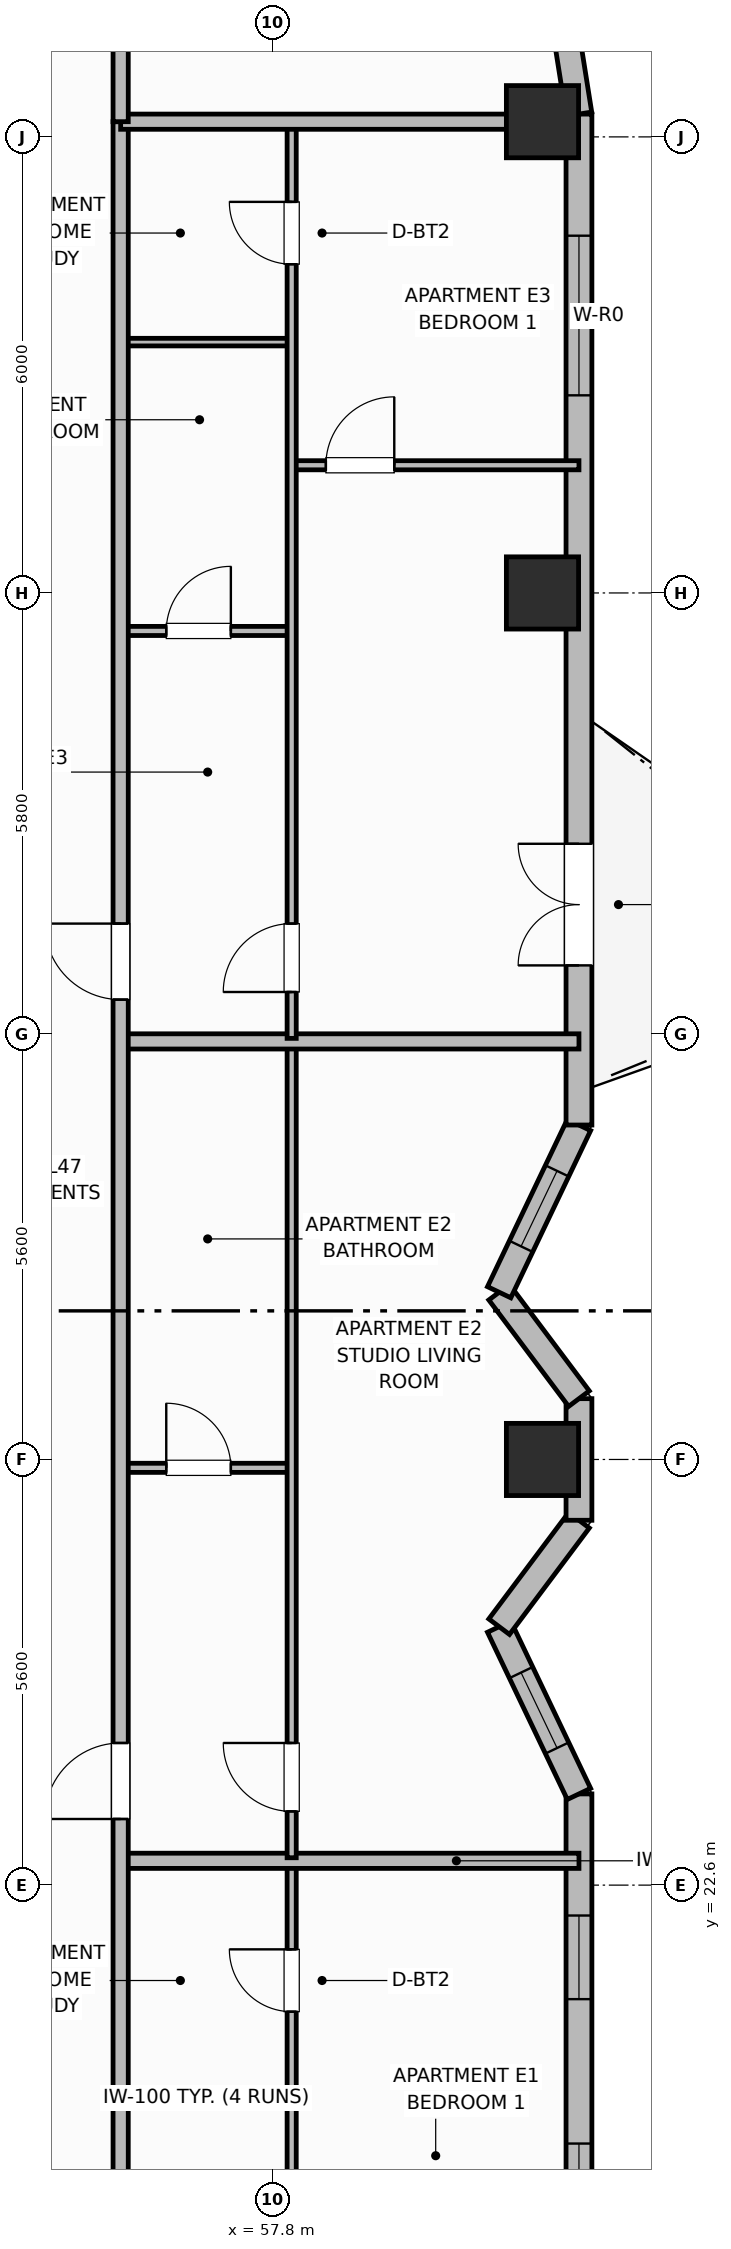
"""IFC4 building model, lengths in metres.
Left out: names, types, materials, properties, quantities, classifications, styles, units other than length and angle.
Written with IfcOpenShell. Run it as: python <this file> out.ifc"""

import sys

from ifc_helpers import new_model, si_unit, direction, frame, frame_2d, origin, origin_2d, place, context, subcontext, project, spatial, rectangle, extrude, element, fill, save


model = new_model("IFC4")
c1 = context("Model", 3, precision=1e-05, world=origin(), true_north=direction((0.0, 1.0)))
c2 = subcontext(c1, "Body", "Model", "MODEL_VIEW")
j1 = project(units=[si_unit("LENGTHUNIT", "METRE"), si_unit("PLANEANGLEUNIT", "RADIAN")], contexts=[c1])
p1 = place(None, origin())
s1 = spatial("IfcSite", under=j1, at=p1, CompositionType="ELEMENT")
p2 = place(p1, origin())
s2 = spatial("IfcBuilding", under=s1, at=p2, CompositionType="ELEMENT")
p3 = place(p2, frame((0.0, 0.0, 188.5)))
s3 = spatial("IfcBuildingStorey", under=s2, at=p3, CompositionType="ELEMENT", Elevation=188.5)
for number, where, z_axis, x_axis in (
    (1, (61.35, 28.2, 0.0), (0.0, 0.0, 1.0), (1.0, 0.0, 0.0)),
    (2, (61.35, 39.6, 0.0), (0.0, 0.0, 1.0), (1.0, 0.0, 0.0)),
    (3, (61.35, 45.8, 0.0), (0.0, 0.0, 1.0), (1.0, 0.0, 0.0)),
):
    element("IfcColumn", number, at=place(p3, frame(where, z_axis=z_axis, x_axis=x_axis)), inside=s3, PredefinedType="COLUMN", context=c2, shape_type="SweptSolid", body=[
        extrude(rectangle(XDim=0.95, YDim=0.95, at=origin_2d()), origin(), (0.0, 0.0, 1.0), 3.7),
    ])
p4 = place(p3, frame((61.83, 10.5, 0.0), z_axis=(0.0, 0.0, 1.0), x_axis=(0.0, 1.0, 0.0)))
e4 = element("IfcWall", 4, at=p4, inside=s3, PredefinedType="SOLIDWALL", context=c2, shape_type="SweptSolid", body=[
    extrude(rectangle(XDim=13.3, YDim=0.34, at=frame_2d((6.65, 0.0))), origin(), (0.0, 0.0, 1.0), 2.72),
])
p5 = place(p4, frame((1.6, 0.0, 0.95)))
e5 = element("IfcOpeningElement", 5, at=p5, cuts=e4, PredefinedType="OPENING", context=c2, shape_type="SweptSolid", body=[
    extrude(rectangle(XDim=1.1, YDim=1.65, at=frame_2d((0.55, 0.825))), frame((0.0, 0.18, 0.0), z_axis=(0.0, -1.0, 0.0), x_axis=(1.0, 0.0, 0.0)), (0.0, 0.0, 1.0), 0.36),
])
p6 = place(p4, frame((7.6, 0.0, 0.95)))
e6 = element("IfcOpeningElement", 6, at=p6, cuts=e4, PredefinedType="OPENING", context=c2, shape_type="SweptSolid", body=[
    extrude(rectangle(XDim=1.1, YDim=1.65, at=frame_2d((0.55, 0.825))), frame((0.0, 0.18, 0.0), z_axis=(0.0, -1.0, 0.0), x_axis=(1.0, 0.0, 0.0)), (0.0, 0.0, 1.0), 0.36),
])
p7 = place(p4, frame((10.6, 0.0, 0.95)))
e7 = element("IfcOpeningElement", 7, at=p7, cuts=e4, PredefinedType="OPENING", context=c2, shape_type="SweptSolid", body=[
    extrude(rectangle(XDim=1.1, YDim=1.65, at=frame_2d((0.55, 0.825))), frame((0.0, 0.18, 0.0), z_axis=(0.0, -1.0, 0.0), x_axis=(1.0, 0.0, 0.0)), (0.0, 0.0, 1.0), 0.36),
])
p8 = place(p3, frame((61.83, 23.8, 0.0), z_axis=(0.0, 0.0, 1.0), x_axis=(-0.430753686581, 0.902469534941, 0.0)))
e8 = element("IfcWall", 8, at=p8, inside=s3, PredefinedType="SOLIDWALL", context=c2, shape_type="SweptSolid", body=[
    extrude(rectangle(XDim=2.438, YDim=0.34, at=frame_2d((1.219, 0.0))), origin(), (0.0, 0.0, 1.0), 2.72),
])
p9 = place(p8, frame((0.669, 0.0, 0.91)))
e9 = element("IfcOpeningElement", 9, at=p9, cuts=e8, PredefinedType="OPENING", context=c2, shape_type="SweptSolid", body=[
    extrude(rectangle(XDim=1.1, YDim=1.65, at=frame_2d((0.55, 0.825))), frame((0.0, 0.18, 0.0), z_axis=(0.0, -1.0, 0.0), x_axis=(1.0, 0.0, 0.0)), (0.0, 0.0, 1.0), 0.36),
])
p10 = place(p3, frame((60.78, 26.0, 0.0), z_axis=(0.0, 0.0, 1.0), x_axis=(0.600044643168, 0.799966515677, 0.0)))
e10 = element("IfcWall", 10, at=p10, inside=s3, PredefinedType="SOLIDWALL", context=c2, shape_type="SweptSolid", body=[
    extrude(rectangle(XDim=1.75, YDim=0.34, at=frame_2d((0.875, 0.0))), origin(), (0.0, 0.0, 1.0), 2.72),
])
p11 = place(p3, frame((61.83, 27.4, 0.0), z_axis=(0.0, 0.0, 1.0), x_axis=(0.0, 1.0, 0.0)))
e11 = element("IfcWall", 11, at=p11, inside=s3, PredefinedType="SOLIDWALL", context=c2, shape_type="SweptSolid", body=[
    extrude(rectangle(XDim=1.6, YDim=0.34, at=frame_2d((0.8, 0.0))), origin(), (0.0, 0.0, 1.0), 2.72),
])
p12 = place(p3, frame((61.83, 29.0, 0.0), z_axis=(0.0, 0.0, 1.0), x_axis=(-0.600044643168, 0.799966515677, 0.0)))
e12 = element("IfcWall", 12, at=p12, inside=s3, PredefinedType="SOLIDWALL", context=c2, shape_type="SweptSolid", body=[
    extrude(rectangle(XDim=1.75, YDim=0.34, at=frame_2d((0.875, 0.0))), origin(), (0.0, 0.0, 1.0), 2.72),
])
p13 = place(p3, frame((60.78, 30.4, 0.0), z_axis=(0.0, 0.0, 1.0), x_axis=(0.430714756408, 0.902488115496, 0.0)))
e13 = element("IfcWall", 13, at=p13, inside=s3, PredefinedType="SOLIDWALL", context=c2, shape_type="SweptSolid", body=[
    extrude(rectangle(XDim=2.438, YDim=0.34, at=frame_2d((1.219, 0.0))), origin(), (0.0, 0.0, 1.0), 2.72),
])
p14 = place(p13, frame((0.669, 0.0, 0.91)))
e14 = element("IfcOpeningElement", 14, at=p14, cuts=e13, PredefinedType="OPENING", context=c2, shape_type="SweptSolid", body=[
    extrude(rectangle(XDim=1.1, YDim=1.65, at=frame_2d((0.55, 0.825))), frame((0.0, 0.18, 0.0), z_axis=(0.0, -1.0, 0.0), x_axis=(1.0, 0.0, 0.0)), (0.0, 0.0, 1.0), 0.36),
])
p15 = place(p3, frame((61.83, 32.6, 0.0), z_axis=(0.0, 0.0, 1.0), x_axis=(0.0, 1.0, 0.0)))
e15 = element("IfcWall", 15, at=p15, inside=s3, PredefinedType="SOLIDWALL", context=c2, shape_type="SweptSolid", body=[
    extrude(rectangle(XDim=13.3, YDim=0.34, at=frame_2d((6.65, 0.0))), origin(), (0.0, 0.0, 1.0), 2.72),
])
p16 = place(p15, frame((2.1, 0.0, 0.0)))
e16 = element("IfcOpeningElement", 16, at=p16, cuts=e15, PredefinedType="OPENING", context=c2, shape_type="SweptSolid", body=[
    extrude(rectangle(XDim=1.6, YDim=2.1, at=frame_2d((0.8, 1.05))), frame((0.0, 0.18, 0.0), z_axis=(0.0, -1.0, 0.0), x_axis=(1.0, 0.0, 0.0)), (0.0, 0.0, 1.0), 0.36),
])
p17 = place(p15, frame((9.6, 0.0, 0.7)))
e17 = element("IfcOpeningElement", 17, at=p17, cuts=e15, PredefinedType="OPENING", context=c2, shape_type="SweptSolid", body=[
    extrude(rectangle(XDim=2.1, YDim=1.9, at=frame_2d((1.05, 0.95))), frame((0.0, 0.18, 0.0), z_axis=(0.0, -1.0, 0.0), x_axis=(1.0, 0.0, 0.0)), (0.0, 0.0, 1.0), 0.36),
])
p18 = place(p3, frame((61.83, 45.9, 0.0), z_axis=(0.0, 0.0, 1.0), x_axis=(-0.156481329164, 0.987680916907, 0.0)))
e18 = element("IfcWall", 18, at=p18, inside=s3, PredefinedType="SOLIDWALL", context=c2, shape_type="SweptSolid", body=[
    extrude(rectangle(XDim=1.136, YDim=0.34, at=frame_2d((0.568, 0.0))), origin(), (0.0, 0.0, 1.0), 2.72),
])
p19 = place(p3, frame((55.8, 19.8, 0.0), z_axis=(0.0, 0.0, 1.0), x_axis=(1.0, 0.0, 0.0)))
e19 = element("IfcWall", 19, at=p19, inside=s3, PredefinedType="PARTITIONING", context=c2, shape_type="SweptSolid", body=[
    extrude(rectangle(XDim=2.25, YDim=0.1, at=frame_2d((1.125, 0.0))), origin(), (0.0, 0.0, 1.0), 2.55),
])
p20 = place(p3, frame((58.05, 10.64, 0.0), z_axis=(0.0, 0.0, 1.0), x_axis=(0.0, 1.0, 0.0)))
e20 = element("IfcWall", 20, at=p20, inside=s3, PredefinedType="PARTITIONING", context=c2, shape_type="SweptSolid", body=[
    extrude(rectangle(XDim=12.24, YDim=0.12, at=frame_2d((6.12, 0.0))), origin(), (0.0, 0.0, 1.0), 2.55),
])
p21 = place(p20, frame((0.41, 0.0, 0.0)))
e21 = element("IfcOpeningElement", 21, at=p21, cuts=e20, PredefinedType="OPENING", context=c2, shape_type="SweptSolid", body=[
    extrude(rectangle(XDim=0.9, YDim=2.1, at=frame_2d((0.45, 1.05))), frame((0.0, 0.07, 0.0), z_axis=(0.0, -1.0, 0.0), x_axis=(1.0, 0.0, 0.0)), (0.0, 0.0, 1.0), 0.14),
])
p22 = place(p20, frame((10.295, 0.0, 0.0)))
e22 = element("IfcOpeningElement", 22, at=p22, cuts=e20, PredefinedType="OPENING", context=c2, shape_type="SweptSolid", body=[
    extrude(rectangle(XDim=0.82, YDim=2.08, at=frame_2d((0.41, 1.04))), frame((0.0, 0.07, 0.0), z_axis=(0.0, -1.0, 0.0), x_axis=(1.0, 0.0, 0.0)), (0.0, 0.0, 1.0), 0.14),
])
p23 = place(p3, frame((55.8, 22.92, 0.0), z_axis=(0.0, 0.0, 1.0), x_axis=(1.0, 0.0, 0.0)))
e23 = element("IfcWall", 23, at=p23, inside=s3, PredefinedType="PARTITIONING", context=c2, shape_type="SweptSolid", body=[
    extrude(rectangle(XDim=6.03, YDim=0.2, at=frame_2d((3.015, 0.0))), origin(), (0.0, 0.0, 1.0), 2.55),
])
p24 = place(p3, frame((55.8, 28.09, 0.0), z_axis=(0.0, 0.0, 1.0), x_axis=(1.0, 0.0, 0.0)))
e24 = element("IfcWall", 24, at=p24, inside=s3, PredefinedType="PARTITIONING", context=c2, shape_type="SweptSolid", body=[
    extrude(rectangle(XDim=2.25, YDim=0.12, at=frame_2d((1.125, 0.0))), origin(), (0.0, 0.0, 1.0), 2.55),
])
p25 = place(p24, frame((0.6, 0.0, 0.0)))
e25 = element("IfcOpeningElement", 25, at=p25, cuts=e24, PredefinedType="OPENING", context=c2, shape_type="SweptSolid", body=[
    extrude(rectangle(XDim=0.85, YDim=2.1, at=frame_2d((0.425, 1.05))), frame((0.0, 0.07, 0.0), z_axis=(0.0, -1.0, 0.0), x_axis=(1.0, 0.0, 0.0)), (0.0, 0.0, 1.0), 0.14),
])
p26 = place(p3, frame((58.05, 22.96, 0.0), z_axis=(0.0, 0.0, 1.0), x_axis=(0.0, 1.0, 0.0)))
e26 = element("IfcWall", 26, at=p26, inside=s3, PredefinedType="PARTITIONING", context=c2, shape_type="SweptSolid", body=[
    extrude(rectangle(XDim=10.7, YDim=0.12, at=frame_2d((5.35, 0.0))), origin(), (0.0, 0.0, 1.0), 2.55),
])
p27 = place(p26, frame((0.61, 0.0, 0.0)))
e27 = element("IfcOpeningElement", 27, at=p27, cuts=e26, PredefinedType="OPENING", context=c2, shape_type="SweptSolid", body=[
    extrude(rectangle(XDim=0.9, YDim=2.1, at=frame_2d((0.45, 1.05))), frame((0.0, 0.07, 0.0), z_axis=(0.0, -1.0, 0.0), x_axis=(1.0, 0.0, 0.0)), (0.0, 0.0, 1.0), 0.14),
])
p28 = place(p3, frame((55.8, 33.7, 0.0), z_axis=(0.0, 0.0, 1.0), x_axis=(1.0, 0.0, 0.0)))
e28 = element("IfcWall", 28, at=p28, inside=s3, PredefinedType="PARTITIONING", context=c2, shape_type="SweptSolid", body=[
    extrude(rectangle(XDim=6.03, YDim=0.2, at=frame_2d((3.015, 0.0))), origin(), (0.0, 0.0, 1.0), 2.55),
])
p29 = place(p3, frame((55.8, 39.1, 0.0), z_axis=(0.0, 0.0, 1.0), x_axis=(1.0, 0.0, 0.0)))
e29 = element("IfcWall", 29, at=p29, inside=s3, PredefinedType="PARTITIONING", context=c2, shape_type="SweptSolid", body=[
    extrude(rectangle(XDim=2.25, YDim=0.12, at=frame_2d((1.125, 0.0))), origin(), (0.0, 0.0, 1.0), 2.55),
])
p30 = place(p29, frame((0.6, 0.0, 0.0)))
e30 = element("IfcOpeningElement", 30, at=p30, cuts=e29, PredefinedType="OPENING", context=c2, shape_type="SweptSolid", body=[
    extrude(rectangle(XDim=0.85, YDim=2.1, at=frame_2d((0.425, 1.05))), frame((0.0, 0.07, 0.0), z_axis=(0.0, -1.0, 0.0), x_axis=(1.0, 0.0, 0.0)), (0.0, 0.0, 1.0), 0.14),
])
p31 = place(p3, frame((55.8, 42.9, 0.0), z_axis=(0.0, 0.0, 1.0), x_axis=(1.0, 0.0, 0.0)))
e31 = element("IfcWall", 31, at=p31, inside=s3, PredefinedType="PARTITIONING", context=c2, shape_type="SweptSolid", body=[
    extrude(rectangle(XDim=2.25, YDim=0.1, at=frame_2d((1.125, 0.0))), origin(), (0.0, 0.0, 1.0), 2.55),
])
p32 = place(p3, frame((58.05, 41.28, 0.0), z_axis=(0.0, 0.0, 1.0), x_axis=(1.0, 0.0, 0.0)))
e32 = element("IfcWall", 32, at=p32, inside=s3, PredefinedType="PARTITIONING", context=c2, shape_type="SweptSolid", body=[
    extrude(rectangle(XDim=3.78, YDim=0.12, at=frame_2d((1.89, 0.0))), origin(), (0.0, 0.0, 1.0), 2.55),
])
p33 = place(p32, frame((0.45, 0.0, 0.0)))
e33 = element("IfcOpeningElement", 33, at=p33, cuts=e32, PredefinedType="OPENING", context=c2, shape_type="SweptSolid", body=[
    extrude(rectangle(XDim=0.9, YDim=2.1, at=frame_2d((0.45, 1.05))), frame((0.0, 0.07, 0.0), z_axis=(0.0, -1.0, 0.0), x_axis=(1.0, 0.0, 0.0)), (0.0, 0.0, 1.0), 0.14),
])
p34 = place(p3, frame((58.05, 33.74, 0.0), z_axis=(0.0, 0.0, 1.0), x_axis=(0.0, 1.0, 0.0)))
e34 = element("IfcWall", 34, at=p34, inside=s3, PredefinedType="PARTITIONING", context=c2, shape_type="SweptSolid", body=[
    extrude(rectangle(XDim=12.02, YDim=0.12, at=frame_2d((6.01, 0.0))), origin(), (0.0, 0.0, 1.0), 2.55),
])
p35 = place(p34, frame((0.61, 0.0, 0.0)))
e35 = element("IfcOpeningElement", 35, at=p35, cuts=e34, PredefinedType="OPENING", context=c2, shape_type="SweptSolid", body=[
    extrude(rectangle(XDim=0.9, YDim=2.1, at=frame_2d((0.45, 1.05))), frame((0.0, 0.07, 0.0), z_axis=(0.0, -1.0, 0.0), x_axis=(1.0, 0.0, 0.0)), (0.0, 0.0, 1.0), 0.14),
])
p36 = place(p34, frame((10.185, 0.0, 0.0)))
e36 = element("IfcOpeningElement", 36, at=p36, cuts=e34, PredefinedType="OPENING", context=c2, shape_type="SweptSolid", body=[
    extrude(rectangle(XDim=0.82, YDim=2.08, at=frame_2d((0.41, 1.04))), frame((0.0, 0.07, 0.0), z_axis=(0.0, -1.0, 0.0), x_axis=(1.0, 0.0, 0.0)), (0.0, 0.0, 1.0), 0.14),
])
p37 = place(p3, frame((55.8, 10.6, 0.0), z_axis=(0.0, 0.0, 1.0), x_axis=(0.0, 1.0, 0.0)))
e37 = element("IfcWall", 37, at=p37, inside=s3, PredefinedType="PARTITIONING", context=c2, shape_type="SweptSolid", body=[
    extrude(rectangle(XDim=35.2, YDim=0.2, at=frame_2d((17.6, 0.0))), origin(), (0.0, 0.0, 1.0), 2.55),
])
p38 = place(p37, frame((2.65, 0.0, 0.0)))
e38 = element("IfcOpeningElement", 38, at=p38, cuts=e37, PredefinedType="OPENING", context=c2, shape_type="SweptSolid", body=[
    extrude(rectangle(XDim=1.0, YDim=2.15, at=frame_2d((0.5, 1.075))), frame((0.0, 0.11, 0.0), z_axis=(0.0, -1.0, 0.0), x_axis=(1.0, 0.0, 0.0)), (0.0, 0.0, 1.0), 0.22),
])
p39 = place(p37, frame((12.87, 0.0, 0.0)))
e39 = element("IfcOpeningElement", 39, at=p39, cuts=e37, PredefinedType="OPENING", context=c2, shape_type="SweptSolid", body=[
    extrude(rectangle(XDim=1.0, YDim=2.15, at=frame_2d((0.5, 1.075))), frame((0.0, 0.11, 0.0), z_axis=(0.0, -1.0, 0.0), x_axis=(1.0, 0.0, 0.0)), (0.0, 0.0, 1.0), 0.22),
])
p40 = place(p37, frame((23.65, 0.0, 0.0)))
e40 = element("IfcOpeningElement", 40, at=p40, cuts=e37, PredefinedType="OPENING", context=c2, shape_type="SweptSolid", body=[
    extrude(rectangle(XDim=1.0, YDim=2.15, at=frame_2d((0.5, 1.075))), frame((0.0, 0.11, 0.0), z_axis=(0.0, -1.0, 0.0), x_axis=(1.0, 0.0, 0.0)), (0.0, 0.0, 1.0), 0.22),
])
p41 = place(p3, frame((55.8, 45.8, 0.0), z_axis=(0.0, 0.0, 1.0), x_axis=(1.0, 0.0, 0.0)))
e41 = element("IfcWall", 41, at=p41, inside=s3, PredefinedType="PARTITIONING", context=c2, shape_type="SweptSolid", body=[
    extrude(rectangle(XDim=5.61, YDim=0.2, at=frame_2d((2.805, 0.0))), origin(), (0.0, 0.0, 1.0), 2.55),
])
p42 = place(p3, frame((55.8, 45.8, 0.0), z_axis=(0.0, 0.0, 1.0), x_axis=(0.0, 1.0, 0.0)))
e42 = element("IfcWall", 42, at=p42, inside=s3, PredefinedType="PARTITIONING", context=c2, shape_type="SweptSolid", body=[
    extrude(rectangle(XDim=3.73, YDim=0.2, at=frame_2d((1.865, 0.0))), origin(), (0.0, 0.0, 1.0), 2.55),
])
p43 = place(p6, origin())
e43 = element("IfcWindow", 43, at=p43, inside=s3, PartitioningType="SINGLE_PANEL", PredefinedType="WINDOW", context=c2, shape_type="SweptSolid", body=[
    extrude(rectangle(XDim=1.1, YDim=1.65, at=frame_2d((0.55, 0.825))), frame((0.0, 0.03, 0.0), z_axis=(0.0, -1.0, 0.0), x_axis=(1.0, 0.0, 0.0)), (0.0, 0.0, 1.0), 0.06),
])
fill(e6, e43)
p44 = place(p7, origin())
e44 = element("IfcWindow", 44, at=p44, inside=s3, PartitioningType="SINGLE_PANEL", PredefinedType="WINDOW", context=c2, shape_type="SweptSolid", body=[
    extrude(rectangle(XDim=1.1, YDim=1.65, at=frame_2d((0.55, 0.825))), frame((0.0, 0.03, 0.0), z_axis=(0.0, -1.0, 0.0), x_axis=(1.0, 0.0, 0.0)), (0.0, 0.0, 1.0), 0.06),
])
fill(e7, e44)
p45 = place(p9, origin())
e45 = element("IfcWindow", 45, at=p45, inside=s3, PartitioningType="SINGLE_PANEL", PredefinedType="WINDOW", context=c2, shape_type="SweptSolid", body=[
    extrude(rectangle(XDim=1.1, YDim=1.65, at=frame_2d((0.55, 0.825))), frame((0.0, 0.03, 0.0), z_axis=(0.0, -1.0, 0.0), x_axis=(1.0, 0.0, 0.0)), (0.0, 0.0, 1.0), 0.06),
])
fill(e9, e45)
p46 = place(p14, origin())
e46 = element("IfcWindow", 46, at=p46, inside=s3, PartitioningType="SINGLE_PANEL", PredefinedType="WINDOW", context=c2, shape_type="SweptSolid", body=[
    extrude(rectangle(XDim=1.1, YDim=1.65, at=frame_2d((0.55, 0.825))), frame((0.0, 0.03, 0.0), z_axis=(0.0, -1.0, 0.0), x_axis=(1.0, 0.0, 0.0)), (0.0, 0.0, 1.0), 0.06),
])
fill(e14, e46)
p47 = place(p16, origin())
e47 = element("IfcDoor", 47, at=p47, inside=s3, OperationType="DOUBLE_DOOR_SINGLE_SWING", PredefinedType="DOOR", context=c2, shape_type="SweptSolid", body=[
    extrude(rectangle(XDim=1.6, YDim=2.1, at=frame_2d((0.8, 1.05))), frame((0.0, 0.025, 0.0), z_axis=(0.0, -1.0, 0.0), x_axis=(1.0, 0.0, 0.0)), (0.0, 0.0, 1.0), 0.05),
])
fill(e16, e47)
p48 = place(p17, origin())
e48 = element("IfcWindow", 48, at=p48, inside=s3, PartitioningType="SINGLE_PANEL", PredefinedType="WINDOW", context=c2, shape_type="SweptSolid", body=[
    extrude(rectangle(XDim=2.1, YDim=1.9, at=frame_2d((1.05, 0.95))), frame((0.0, 0.03, 0.0), z_axis=(0.0, -1.0, 0.0), x_axis=(1.0, 0.0, 0.0)), (0.0, 0.0, 1.0), 0.06),
])
fill(e17, e48)
p49 = place(p22, origin())
e49 = element("IfcDoor", 49, at=p49, inside=s3, OperationType="SINGLE_SWING_RIGHT", PredefinedType="DOOR", context=c2, shape_type="SweptSolid", body=[
    extrude(rectangle(XDim=0.82, YDim=2.08, at=frame_2d((0.41, 1.04))), frame((0.0, 0.025, 0.0), z_axis=(0.0, -1.0, 0.0), x_axis=(1.0, 0.0, 0.0)), (0.0, 0.0, 1.0), 0.05),
])
fill(e22, e49)
p50 = place(p25, origin())
e50 = element("IfcDoor", 50, at=p50, inside=s3, OperationType="SINGLE_SWING_LEFT", PredefinedType="DOOR", context=c2, shape_type="SweptSolid", body=[
    extrude(rectangle(XDim=0.85, YDim=2.1, at=frame_2d((0.425, 1.05))), frame((0.0, 0.025, 0.0), z_axis=(0.0, -1.0, 0.0), x_axis=(1.0, 0.0, 0.0)), (0.0, 0.0, 1.0), 0.05),
])
fill(e25, e50)
p51 = place(p27, origin())
e51 = element("IfcDoor", 51, at=p51, inside=s3, OperationType="SINGLE_SWING_RIGHT", PredefinedType="DOOR", context=c2, shape_type="SweptSolid", body=[
    extrude(rectangle(XDim=0.9, YDim=2.1, at=frame_2d((0.45, 1.05))), frame((0.0, 0.025, 0.0), z_axis=(0.0, -1.0, 0.0), x_axis=(1.0, 0.0, 0.0)), (0.0, 0.0, 1.0), 0.05),
])
fill(e27, e51)
p52 = place(p30, origin())
e52 = element("IfcDoor", 52, at=p52, inside=s3, OperationType="SINGLE_SWING_RIGHT", PredefinedType="DOOR", context=c2, shape_type="SweptSolid", body=[
    extrude(rectangle(XDim=0.85, YDim=2.1, at=frame_2d((0.425, 1.05))), frame((0.0, 0.025, 0.0), z_axis=(0.0, -1.0, 0.0), x_axis=(1.0, 0.0, 0.0)), (0.0, 0.0, 1.0), 0.05),
])
fill(e30, e52)
p53 = place(p33, origin())
e53 = element("IfcDoor", 53, at=p53, inside=s3, OperationType="SINGLE_SWING_RIGHT", PredefinedType="DOOR", context=c2, shape_type="SweptSolid", body=[
    extrude(rectangle(XDim=0.9, YDim=2.1, at=frame_2d((0.45, 1.05))), frame((0.0, 0.025, 0.0), z_axis=(0.0, -1.0, 0.0), x_axis=(1.0, 0.0, 0.0)), (0.0, 0.0, 1.0), 0.05),
])
fill(e33, e53)
p54 = place(p35, origin())
e54 = element("IfcDoor", 54, at=p54, inside=s3, OperationType="SINGLE_SWING_LEFT", PredefinedType="DOOR", context=c2, shape_type="SweptSolid", body=[
    extrude(rectangle(XDim=0.9, YDim=2.1, at=frame_2d((0.45, 1.05))), frame((0.0, 0.025, 0.0), z_axis=(0.0, -1.0, 0.0), x_axis=(1.0, 0.0, 0.0)), (0.0, 0.0, 1.0), 0.05),
])
fill(e35, e54)
p55 = place(p36, origin())
e55 = element("IfcDoor", 55, at=p55, inside=s3, OperationType="SINGLE_SWING_RIGHT", PredefinedType="DOOR", context=c2, shape_type="SweptSolid", body=[
    extrude(rectangle(XDim=0.82, YDim=2.08, at=frame_2d((0.41, 1.04))), frame((0.0, 0.025, 0.0), z_axis=(0.0, -1.0, 0.0), x_axis=(1.0, 0.0, 0.0)), (0.0, 0.0, 1.0), 0.05),
])
fill(e36, e55)
p56 = place(p39, origin())
e56 = element("IfcDoor", 56, at=p56, inside=s3, OperationType="SINGLE_SWING_LEFT", PredefinedType="DOOR", context=c2, shape_type="SweptSolid", body=[
    extrude(rectangle(XDim=1.0, YDim=2.15, at=frame_2d((0.5, 1.075))), frame((0.0, 0.025, 0.0), z_axis=(0.0, -1.0, 0.0), x_axis=(1.0, 0.0, 0.0)), (0.0, 0.0, 1.0), 0.05),
])
fill(e39, e56)
p57 = place(p40, origin())
e57 = element("IfcDoor", 57, at=p57, inside=s3, OperationType="SINGLE_SWING_RIGHT", PredefinedType="DOOR", context=c2, shape_type="SweptSolid", body=[
    extrude(rectangle(XDim=1.0, YDim=2.15, at=frame_2d((0.5, 1.075))), frame((0.0, 0.025, 0.0), z_axis=(0.0, -1.0, 0.0), x_axis=(1.0, 0.0, 0.0)), (0.0, 0.0, 1.0), 0.05),
])
fill(e40, e57)
save(model, sys.argv[1])
